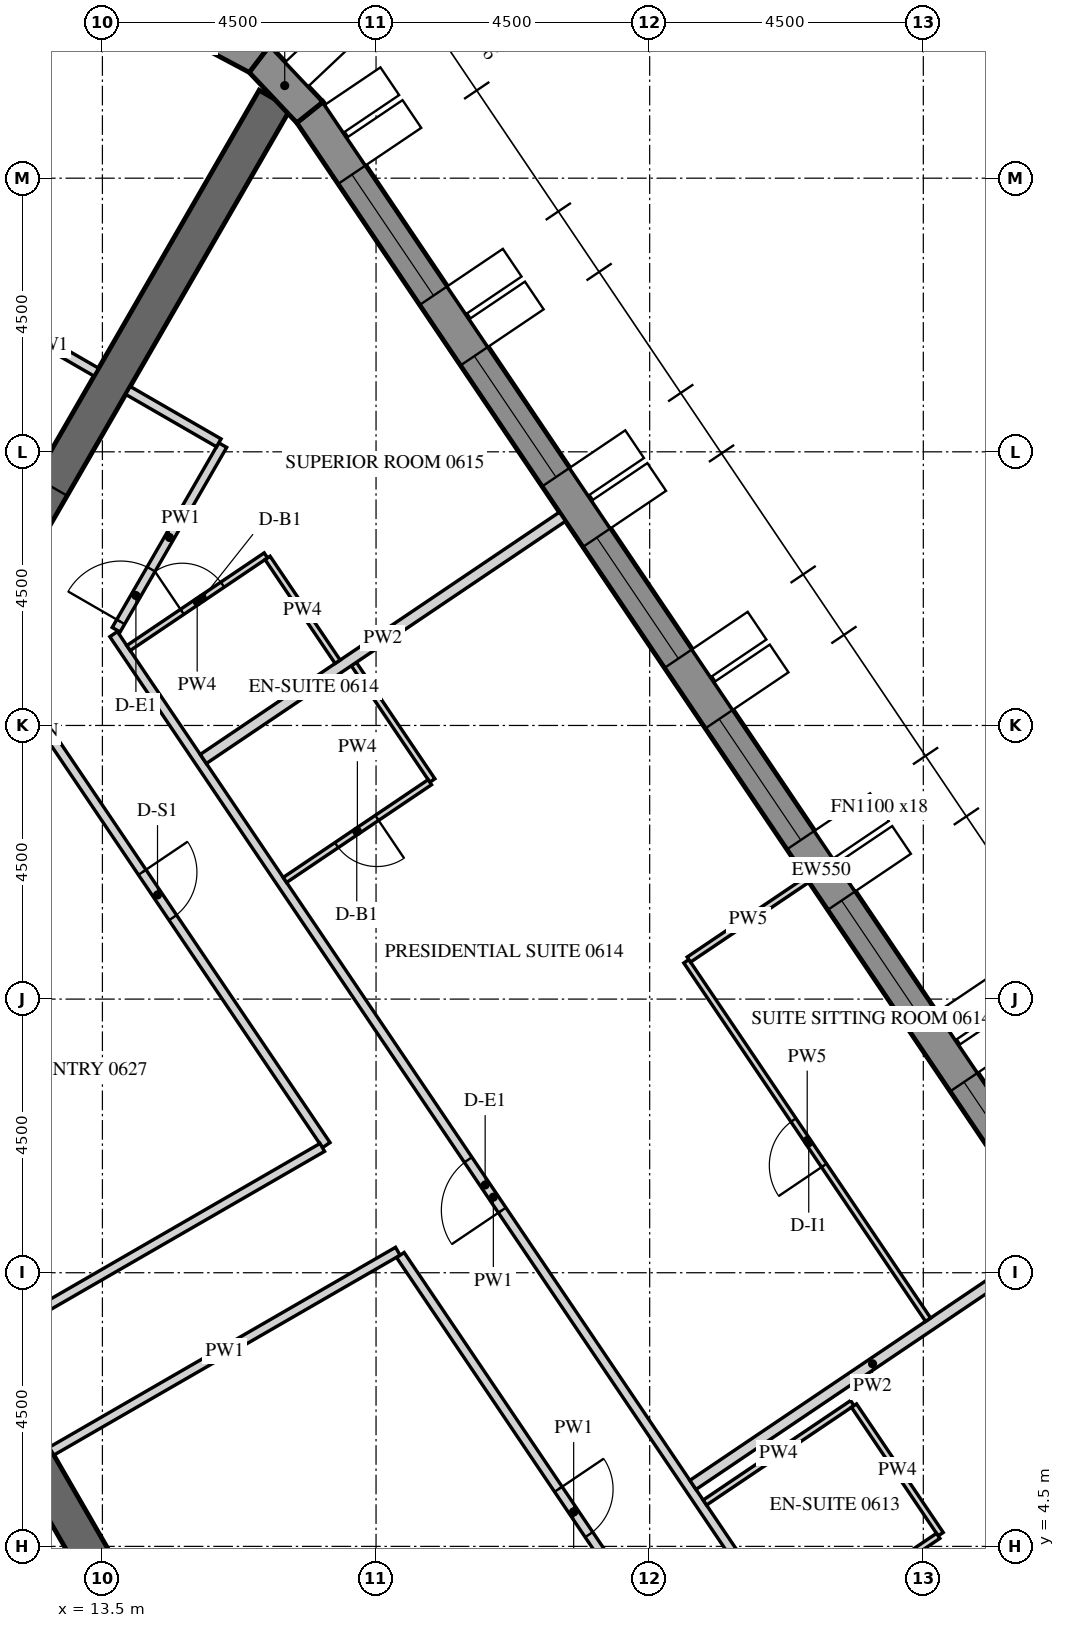
"""IFC4 building model, lengths in metres.
Left out: names, types, materials, properties, quantities, classifications, styles, units other than length and angle.
Written with IfcOpenShell. Run it as: python <this file> out.ifc"""

import sys

from ifc_helpers import new_model, si_unit, direction, frame, frame_2d, origin, place, context, subcontext, project, spatial, polyline, rectangle, outline, extrude, element, fill, save


model = new_model("IFC4")
c1 = context("Model", 3, precision=1e-05, world=origin(), true_north=direction((0.0, 1.0)))
c2 = subcontext(c1, "Body", "Model", "MODEL_VIEW")
j1 = project(units=[si_unit("LENGTHUNIT", "METRE"), si_unit("PLANEANGLEUNIT", "RADIAN")], contexts=[c1])
p1 = place(None, origin())
s1 = spatial("IfcSite", under=j1, at=p1, CompositionType="ELEMENT")
p2 = place(p1, origin())
s2 = spatial("IfcBuilding", under=s1, at=p2, CompositionType="ELEMENT")
p3 = place(p2, frame((0.0, 0.0, 92.1)))
s3 = spatial("IfcBuildingStorey", under=s2, at=p3, CompositionType="ELEMENT", Elevation=92.1)
p4 = place(p3, frame((33.728, 3.153, -0.15), z_axis=(0.0, 0.0, 1.0), x_axis=(-0.559192411416, 0.82903790445, 0.0)))
e1 = element("IfcWall", 1, at=p4, inside=s3, PredefinedType="SOLIDWALL", context=c2, shape_type="SweptSolid", body=[
    extrude(outline(polyline([(-0.026, -0.275), (30.093, -0.275), (30.048, 0.275), (0.026, 0.275), (-0.026, -0.275)])), origin(), (0.0, 0.0, 1.0), 3.9),
])
p5 = place(p4, frame((1.236, 0.0, 1.05)))
e2 = element("IfcOpeningElement", 2, at=p5, cuts=e1, PredefinedType="OPENING", context=c2, shape_type="SweptSolid", body=[
    extrude(rectangle(XDim=2.4, YDim=2.4, at=frame_2d((1.2, 1.2))), frame((0.0, 0.285, 0.0), z_axis=(0.0, -1.0, 0.0), x_axis=(1.0, 0.0, 0.0)), (0.0, 0.0, 1.0), 0.57),
])
p6 = place(p4, frame((4.835, 0.0, 1.05)))
e3 = element("IfcOpeningElement", 3, at=p6, cuts=e1, PredefinedType="OPENING", context=c2, shape_type="SweptSolid", body=[
    extrude(rectangle(XDim=2.4, YDim=2.4, at=frame_2d((1.2, 1.2))), frame((0.0, 0.285, 0.0), z_axis=(0.0, -1.0, 0.0), x_axis=(1.0, 0.0, 0.0)), (0.0, 0.0, 1.0), 0.57),
])
p7 = place(p4, frame((8.436, 0.0, 1.05)))
e4 = element("IfcOpeningElement", 4, at=p7, cuts=e1, PredefinedType="OPENING", context=c2, shape_type="SweptSolid", body=[
    extrude(rectangle(XDim=2.4, YDim=2.4, at=frame_2d((1.2, 1.2))), frame((0.0, 0.285, 0.0), z_axis=(0.0, -1.0, 0.0), x_axis=(1.0, 0.0, 0.0)), (0.0, 0.0, 1.0), 0.57),
])
p8 = place(p4, frame((12.035, 0.0, 1.05)))
e5 = element("IfcOpeningElement", 5, at=p8, cuts=e1, PredefinedType="OPENING", context=c2, shape_type="SweptSolid", body=[
    extrude(rectangle(XDim=2.4, YDim=2.4, at=frame_2d((1.2, 1.2))), frame((0.0, 0.285, 0.0), z_axis=(0.0, -1.0, 0.0), x_axis=(1.0, 0.0, 0.0)), (0.0, 0.0, 1.0), 0.57),
])
p9 = place(p4, frame((15.635, 0.0, 1.05)))
e6 = element("IfcOpeningElement", 6, at=p9, cuts=e1, PredefinedType="OPENING", context=c2, shape_type="SweptSolid", body=[
    extrude(rectangle(XDim=2.4, YDim=2.4, at=frame_2d((1.2, 1.2))), frame((0.0, 0.285, 0.0), z_axis=(0.0, -1.0, 0.0), x_axis=(1.0, 0.0, 0.0)), (0.0, 0.0, 1.0), 0.57),
])
p10 = place(p4, frame((19.236, 0.0, 1.05)))
e7 = element("IfcOpeningElement", 7, at=p10, cuts=e1, PredefinedType="OPENING", context=c2, shape_type="SweptSolid", body=[
    extrude(rectangle(XDim=2.4, YDim=2.4, at=frame_2d((1.2, 1.2))), frame((0.0, 0.285, 0.0), z_axis=(0.0, -1.0, 0.0), x_axis=(1.0, 0.0, 0.0)), (0.0, 0.0, 1.0), 0.57),
])
p11 = place(p4, frame((22.835, 0.0, 1.05)))
e8 = element("IfcOpeningElement", 8, at=p11, cuts=e1, PredefinedType="OPENING", context=c2, shape_type="SweptSolid", body=[
    extrude(rectangle(XDim=2.4, YDim=2.4, at=frame_2d((1.2, 1.2))), frame((0.0, 0.285, 0.0), z_axis=(0.0, -1.0, 0.0), x_axis=(1.0, 0.0, 0.0)), (0.0, 0.0, 1.0), 0.57),
])
p12 = place(p4, frame((26.436, 0.0, 1.05)))
e9 = element("IfcOpeningElement", 9, at=p12, cuts=e1, PredefinedType="OPENING", context=c2, shape_type="SweptSolid", body=[
    extrude(rectangle(XDim=2.4, YDim=2.4, at=frame_2d((1.2, 1.2))), frame((0.0, 0.285, 0.0), z_axis=(0.0, -1.0, 0.0), x_axis=(1.0, 0.0, 0.0)), (0.0, 0.0, 1.0), 0.57),
])
p13 = place(p3, frame((16.913, 28.083, -0.15), z_axis=(0.0, 0.0, 1.0), x_axis=(-0.686196220404, 0.727416488061, 0.0)))
e10 = element("IfcWall", 10, at=p13, inside=s3, PredefinedType="SOLIDWALL", context=c2, shape_type="SweptSolid", body=[
    extrude(outline(polyline([(-0.022, -0.275), (1.253, -0.275), (1.163, 0.275), (0.022, 0.275), (-0.022, -0.275)])), origin(), (0.0, 0.0, 1.0), 3.9),
])
p14 = place(p3, frame((16.083, 28.962, -0.15), z_axis=(0.0, 0.0, 1.0), x_axis=(-0.882995347911, 0.469381737574, 0.0)))
e11 = element("IfcWall", 11, at=p14, inside=s3, PredefinedType="SOLIDWALL", context=c2, shape_type="SweptSolid", body=[
    extrude(outline(polyline([(-0.045, -0.275), (1.253, -0.275), (1.163, 0.275), (0.045, 0.275), (-0.045, -0.275)])), origin(), (0.0, 0.0, 1.0), 3.9),
])
p15 = place(p3, frame((15.819, 0.0, -0.15), z_axis=(0.0, 0.0, 1.0), x_axis=(-0.499999880136, 0.866025472988, 0.0)))
e12 = element("IfcWall", 12, at=p15, inside=s3, PredefinedType="SHEAR", context=c2, shape_type="SweptSolid", body=[
    extrude(outline(polyline([(-0.173, -0.3), (15.993, -0.3), (15.646, 0.3), (0.173, 0.3), (-0.173, -0.3)])), origin(), (0.0, 0.0, 1.0), 3.9),
])
p16 = place(p15, frame((6.981, 0.0, 0.15)))
e13 = element("IfcOpeningElement", 13, at=p16, cuts=e12, PredefinedType="OPENING", context=c2, shape_type="SweptSolid", body=[
    extrude(rectangle(XDim=1.8, YDim=2.4, at=frame_2d((0.9, 1.2))), frame((0.0, 0.31, 0.0), z_axis=(0.0, -1.0, 0.0), x_axis=(1.0, 0.0, 0.0)), (0.0, 0.0, 1.0), 0.62),
])
p17 = place(p3, frame((8.083, 14.0, -0.15), z_axis=(0.0, 0.0, 1.0), x_axis=(0.499997680643, 0.866026742862, 0.0)))
e14 = element("IfcWall", 14, at=p17, inside=s3, PredefinedType="SHEAR", context=c2, shape_type="SweptSolid", body=[
    extrude(rectangle(XDim=16.509, YDim=0.6, at=frame_2d((8.254, 0.0))), origin(), (0.0, 0.0, 1.0), 3.9),
])
p18 = place(p17, frame((7.354, 0.0, 0.15)))
e15 = element("IfcOpeningElement", 15, at=p18, cuts=e14, PredefinedType="OPENING", context=c2, shape_type="SweptSolid", body=[
    extrude(rectangle(XDim=1.8, YDim=2.4, at=frame_2d((0.9, 1.2))), frame((0.0, 0.31, 0.0), z_axis=(0.0, -1.0, 0.0), x_axis=(1.0, 0.0, 0.0)), (0.0, 0.0, 1.0), 0.62),
])
p19 = place(p3, frame((13.4, 23.81, 0.0), z_axis=(0.0, 0.0, 1.0), x_axis=(-0.865989075817, 0.500062916607, 0.0)))
e16 = element("IfcWall", 16, at=p19, inside=s3, PredefinedType="PARTITIONING", context=c2, shape_type="SweptSolid", body=[
    extrude(rectangle(XDim=1.8, YDim=0.15, at=frame_2d((0.9, 0.0))), origin(), (0.0, 0.0, 1.0), 2.988),
])
p20 = place(p3, frame((26.174, 0.985, 0.0), z_axis=(0.0, 0.0, 1.0), x_axis=(-0.559199676409, 0.82903300411, 0.0)))
e17 = element("IfcWall", 17, at=p20, inside=s3, PredefinedType="PARTITIONING", context=c2, shape_type="SweptSolid", body=[
    extrude(rectangle(XDim=22.335, YDim=0.15, at=frame_2d((11.168, 0.0))), origin(), (0.0, 0.0, 1.0), 2.988),
])
p21 = place(p20, frame((0.863, 0.0, 0.0)))
e18 = element("IfcOpeningElement", 18, at=p21, cuts=e17, PredefinedType="OPENING", context=c2, shape_type="SweptSolid", body=[
    extrude(rectangle(XDim=1.0, YDim=2.1, at=frame_2d((0.5, 1.05))), frame((0.0, 0.085, 0.0), z_axis=(0.0, -1.0, 0.0), x_axis=(1.0, 0.0, 0.0)), (0.0, 0.0, 1.0), 0.17),
])
p22 = place(p20, frame((10.909, 0.0, 0.0)))
e19 = element("IfcOpeningElement", 19, at=p22, cuts=e17, PredefinedType="OPENING", context=c2, shape_type="SweptSolid", body=[
    extrude(rectangle(XDim=1.0, YDim=2.1, at=frame_2d((0.5, 1.05))), frame((0.0, 0.085, 0.0), z_axis=(0.0, -1.0, 0.0), x_axis=(1.0, 0.0, 0.0)), (0.0, 0.0, 1.0), 0.17),
])
p23 = place(p3, frame((13.726, 19.574, 0.0), z_axis=(0.0, 0.0, 1.0), x_axis=(0.499951531933, 0.866053385028, 0.0)))
e20 = element("IfcWall", 20, at=p23, inside=s3, PredefinedType="PARTITIONING", context=c2, shape_type="SweptSolid", body=[
    extrude(rectangle(XDim=3.506, YDim=0.15, at=frame_2d((1.753, 0.0))), origin(), (0.0, 0.0, 1.0), 2.988),
])
p24 = place(p23, frame((0.15, 0.0, 0.0)))
e21 = element("IfcOpeningElement", 21, at=p24, cuts=e20, PredefinedType="OPENING", context=c2, shape_type="SweptSolid", body=[
    extrude(rectangle(XDim=1.0, YDim=2.1, at=frame_2d((0.5, 1.05))), frame((0.0, 0.085, 0.0), z_axis=(0.0, -1.0, 0.0), x_axis=(1.0, 0.0, 0.0)), (0.0, 0.0, 1.0), 0.17),
])
p25 = place(p3, frame((15.414, 22.648, 0.0), z_axis=(0.0, 0.0, 1.0), x_axis=(-0.866074815912, 0.499914405916, 0.0)))
e22 = element("IfcWall", 22, at=p25, inside=s3, PredefinedType="PARTITIONING", context=c2, shape_type="SweptSolid", body=[
    extrude(rectangle(XDim=1.725, YDim=0.15, at=frame_2d((0.862, 0.0))), origin(), (0.0, 0.0, 1.0), 2.988),
])
p26 = place(p3, frame((12.664, 6.066, 0.0), z_axis=(0.0, 0.0, 1.0), x_axis=(0.866027295802, 0.499996722915, 0.0)))
e23 = element("IfcWall", 23, at=p26, inside=s3, PredefinedType="PARTITIONING", context=c2, shape_type="SweptSolid", body=[
    extrude(rectangle(XDim=6.575, YDim=0.15, at=frame_2d((3.288, 0.0))), origin(), (0.0, 0.0, 1.0), 2.988),
])
p27 = place(p3, frame((18.4, 9.291, 0.0), z_axis=(0.0, 0.0, 1.0), x_axis=(0.559191829043, -0.829038297265, 0.0)))
e24 = element("IfcWall", 24, at=p27, inside=s3, PredefinedType="PARTITIONING", context=c2, shape_type="SweptSolid", body=[
    extrude(rectangle(XDim=10.192, YDim=0.15, at=frame_2d((5.096, 0.0))), origin(), (0.0, 0.0, 1.0), 2.988),
])
p28 = place(p27, frame((4.646, 0.0, 0.0)))
e25 = element("IfcOpeningElement", 25, at=p28, cuts=e24, PredefinedType="OPENING", context=c2, shape_type="SweptSolid", body=[
    extrude(rectangle(XDim=0.9, YDim=2.1, at=frame_2d((0.45, 1.05))), frame((0.0, 0.085, 0.0), z_axis=(0.0, -1.0, 0.0), x_axis=(1.0, 0.0, 0.0)), (0.0, 0.0, 1.0), 0.17),
])
p29 = place(p3, frame((11.632, 19.326, 0.0), z_axis=(0.0, 0.0, 1.0), x_axis=(0.559193968377, -0.829036854266, 0.0)))
e26 = element("IfcWall", 26, at=p29, inside=s3, PredefinedType="PARTITIONING", context=c2, shape_type="SweptSolid", body=[
    extrude(rectangle(XDim=9.924, YDim=0.15, at=frame_2d((4.962, 0.0))), origin(), (0.0, 0.0, 1.0), 2.988),
])
p30 = place(p29, frame((4.512, 0.0, 0.0)))
e27 = element("IfcOpeningElement", 27, at=p30, cuts=e26, PredefinedType="OPENING", context=c2, shape_type="SweptSolid", body=[
    extrude(rectangle(XDim=0.9, YDim=2.1, at=frame_2d((0.45, 1.05))), frame((0.0, 0.085, 0.0), z_axis=(0.0, -1.0, 0.0), x_axis=(1.0, 0.0, 0.0)), (0.0, 0.0, 1.0), 0.17),
])
p31 = place(p3, frame((17.116, 11.061, 0.0), z_axis=(0.0, 0.0, 1.0), x_axis=(-0.866021127751, -0.500007406234, 0.0)))
e28 = element("IfcWall", 28, at=p31, inside=s3, PredefinedType="PARTITIONING", context=c2, shape_type="SweptSolid", body=[
    extrude(rectangle(XDim=6.354, YDim=0.15, at=frame_2d((3.177, 0.0))), origin(), (0.0, 0.0, 1.0), 2.988),
])
p32 = place(p3, frame((23.407, 5.221, 0.0), z_axis=(0.0, 0.0, 1.0), x_axis=(0.829007334469, 0.559237730663, 0.0)))
e29 = element("IfcWall", 29, at=p32, inside=s3, PredefinedType="PARTITIONING", context=c2, shape_type="SweptSolid", body=[
    extrude(rectangle(XDim=2.925, YDim=0.1, at=frame_2d((1.462, 0.0))), origin(), (0.0, 0.0, 1.0), 2.988),
])
p33 = place(p3, frame((25.86, 6.815, 0.0), z_axis=(0.0, 0.0, 1.0), x_axis=(0.559155442782, -0.829062838878, 0.0)))
e30 = element("IfcWall", 30, at=p33, inside=s3, PredefinedType="PARTITIONING", context=c2, shape_type="SweptSolid", body=[
    extrude(rectangle(XDim=2.55, YDim=0.1, at=frame_2d((1.275, 0.0))), origin(), (0.0, 0.0, 1.0), 2.988),
])
p34 = place(p3, frame((27.245, 4.673, 0.0), z_axis=(0.0, 0.0, 1.0), x_axis=(-0.82904649496, -0.559179675234, 0.0)))
e31 = element("IfcWall", 31, at=p34, inside=s3, PredefinedType="PARTITIONING", context=c2, shape_type="SweptSolid", body=[
    extrude(rectangle(XDim=2.875, YDim=0.1, at=frame_2d((1.438, 0.0))), origin(), (0.0, 0.0, 1.0), 2.988),
])
p35 = place(p34, frame((1.05, 0.0, 0.0)))
e32 = element("IfcOpeningElement", 32, at=p35, cuts=e31, PredefinedType="OPENING", context=c2, shape_type="SweptSolid", body=[
    extrude(rectangle(XDim=0.8, YDim=2.1, at=frame_2d((0.4, 1.05))), frame((0.0, 0.06, 0.0), z_axis=(0.0, -1.0, 0.0), x_axis=(1.0, 0.0, 0.0)), (0.0, 0.0, 1.0), 0.12),
])
p36 = place(p3, frame((29.119, 9.495, 0.0), z_axis=(0.0, 0.0, 1.0), x_axis=(-0.82903334026, -0.559199178055, 0.0)))
e33 = element("IfcWall", 33, at=p36, inside=s3, PredefinedType="PARTITIONING", context=c2, shape_type="SweptSolid", body=[
    extrude(rectangle(XDim=7.125, YDim=0.18, at=frame_2d((3.562, 0.0))), origin(), (0.0, 0.0, 1.0), 2.988),
])
p37 = place(p3, frame((17.635, 19.01, 0.0), z_axis=(0.0, 0.0, 1.0), x_axis=(0.559204176839, -0.829029968461, 0.0)))
e34 = element("IfcWall", 34, at=p37, inside=s3, PredefinedType="PARTITIONING", context=c2, shape_type="SweptSolid", body=[
    extrude(rectangle(XDim=2.31, YDim=0.1, at=frame_2d((1.155, 0.0))), origin(), (0.0, 0.0, 1.0), 2.988),
])
p38 = place(p3, frame((18.885, 17.067, 0.0), z_axis=(0.0, 0.0, 1.0), x_axis=(-0.829019940088, -0.55921904379, 0.0)))
e35 = element("IfcWall", 35, at=p38, inside=s3, PredefinedType="PARTITIONING", context=c2, shape_type="SweptSolid", body=[
    extrude(rectangle(XDim=2.875, YDim=0.1, at=frame_2d((1.438, 0.0))), origin(), (0.0, 0.0, 1.0), 2.988),
])
p39 = place(p38, frame((1.05, 0.0, 0.0)))
e36 = element("IfcOpeningElement", 36, at=p39, cuts=e35, PredefinedType="OPENING", context=c2, shape_type="SweptSolid", body=[
    extrude(rectangle(XDim=0.8, YDim=2.1, at=frame_2d((0.4, 1.05))), frame((0.0, 0.06, 0.0), z_axis=(0.0, -1.0, 0.0), x_axis=(1.0, 0.0, 0.0)), (0.0, 0.0, 1.0), 0.12),
])
p40 = place(p3, frame((27.079, 8.228, 0.0), z_axis=(0.0, 0.0, 1.0), x_axis=(-0.559200948469, 0.829032146078, 0.0)))
e37 = element("IfcWall", 37, at=p40, inside=s3, PredefinedType="PARTITIONING", context=c2, shape_type="SweptSolid", body=[
    extrude(rectangle(XDim=7.11, YDim=0.1, at=frame_2d((3.555, 0.0))), origin(), (0.0, 0.0, 1.0), 2.988),
])
p41 = place(p40, frame((3.06, 0.0, 0.0)))
e38 = element("IfcOpeningElement", 38, at=p41, cuts=e37, PredefinedType="OPENING", context=c2, shape_type="SweptSolid", body=[
    extrude(rectangle(XDim=0.9, YDim=2.1, at=frame_2d((0.45, 1.05))), frame((0.0, 0.06, 0.0), z_axis=(0.0, -1.0, 0.0), x_axis=(1.0, 0.0, 0.0)), (0.0, 0.0, 1.0), 0.12),
])
p42 = place(p3, frame((23.144, 14.15, 0.0), z_axis=(0.0, 0.0, 1.0), x_axis=(0.829065408555, 0.559151632687, 0.0)))
e39 = element("IfcWall", 39, at=p42, inside=s3, PredefinedType="PARTITIONING", context=c2, shape_type="SweptSolid", body=[
    extrude(rectangle(XDim=2.35, YDim=0.1, at=frame_2d((1.175, 0.0))), origin(), (0.0, 0.0, 1.0), 2.988),
])
p43 = place(p3, frame((21.066, 21.433, 0.0), z_axis=(0.0, 0.0, 1.0), x_axis=(-0.829022625118, -0.559215063318, 0.0)))
e40 = element("IfcWall", 40, at=p43, inside=s3, PredefinedType="PARTITIONING", context=c2, shape_type="SweptSolid", body=[
    extrude(rectangle(XDim=7.125, YDim=0.18, at=frame_2d((3.562, 0.0))), origin(), (0.0, 0.0, 1.0), 2.988),
])
p44 = place(p3, frame((13.929, 19.273, 0.0), z_axis=(0.0, 0.0, 1.0), x_axis=(0.829047014003, 0.559178905694, 0.0)))
e41 = element("IfcWall", 41, at=p44, inside=s3, PredefinedType="PARTITIONING", context=c2, shape_type="SweptSolid", body=[
    extrude(rectangle(XDim=2.725, YDim=0.1, at=frame_2d((1.362, 0.0))), origin(), (0.0, 0.0, 1.0), 2.988),
])
p45 = place(p44, frame((1.065, 0.0, 0.0)))
e42 = element("IfcOpeningElement", 42, at=p45, cuts=e41, PredefinedType="OPENING", context=c2, shape_type="SweptSolid", body=[
    extrude(rectangle(XDim=0.8, YDim=2.1, at=frame_2d((0.4, 1.05))), frame((0.0, 0.06, 0.0), z_axis=(0.0, -1.0, 0.0), x_axis=(1.0, 0.0, 0.0)), (0.0, 0.0, 1.0), 0.12),
])
p46 = place(p3, frame((16.216, 20.755, 0.0), z_axis=(0.0, 0.0, 1.0), x_axis=(0.559259117518, -0.828992906769, 0.0)))
e43 = element("IfcWall", 43, at=p46, inside=s3, PredefinedType="PARTITIONING", context=c2, shape_type="SweptSolid", body=[
    extrude(rectangle(XDim=2.06, YDim=0.1, at=frame_2d((1.03, 0.0))), origin(), (0.0, 0.0, 1.0), 2.988),
])
p47 = place(p7, frame((0.0, 0.205, 0.0)))
e44 = element("IfcWindow", 44, at=p47, inside=s3, PartitioningType="DOUBLE_PANEL_VERTICAL", PredefinedType="WINDOW", context=c2, shape_type="SweptSolid", body=[
    extrude(rectangle(XDim=2.4, YDim=2.4, at=frame_2d((1.2, 1.2))), frame((0.0, 0.03, 0.0), z_axis=(0.0, -1.0, 0.0), x_axis=(1.0, 0.0, 0.0)), (0.0, 0.0, 1.0), 0.06),
])
fill(e4, e44)
p48 = place(p8, frame((0.0, 0.205, 0.0)))
e45 = element("IfcWindow", 45, at=p48, inside=s3, PartitioningType="DOUBLE_PANEL_VERTICAL", PredefinedType="WINDOW", context=c2, shape_type="SweptSolid", body=[
    extrude(rectangle(XDim=2.4, YDim=2.4, at=frame_2d((1.2, 1.2))), frame((0.0, 0.03, 0.0), z_axis=(0.0, -1.0, 0.0), x_axis=(1.0, 0.0, 0.0)), (0.0, 0.0, 1.0), 0.06),
])
fill(e5, e45)
p49 = place(p9, frame((0.0, 0.205, 0.0)))
e46 = element("IfcWindow", 46, at=p49, inside=s3, PartitioningType="DOUBLE_PANEL_VERTICAL", PredefinedType="WINDOW", context=c2, shape_type="SweptSolid", body=[
    extrude(rectangle(XDim=2.4, YDim=2.4, at=frame_2d((1.2, 1.2))), frame((0.0, 0.03, 0.0), z_axis=(0.0, -1.0, 0.0), x_axis=(1.0, 0.0, 0.0)), (0.0, 0.0, 1.0), 0.06),
])
fill(e6, e46)
p50 = place(p10, frame((0.0, 0.205, 0.0)))
e47 = element("IfcWindow", 47, at=p50, inside=s3, PartitioningType="DOUBLE_PANEL_VERTICAL", PredefinedType="WINDOW", context=c2, shape_type="SweptSolid", body=[
    extrude(rectangle(XDim=2.4, YDim=2.4, at=frame_2d((1.2, 1.2))), frame((0.0, 0.03, 0.0), z_axis=(0.0, -1.0, 0.0), x_axis=(1.0, 0.0, 0.0)), (0.0, 0.0, 1.0), 0.06),
])
fill(e7, e47)
p51 = place(p11, frame((0.0, 0.205, 0.0)))
e48 = element("IfcWindow", 48, at=p51, inside=s3, PartitioningType="DOUBLE_PANEL_VERTICAL", PredefinedType="WINDOW", context=c2, shape_type="SweptSolid", body=[
    extrude(rectangle(XDim=2.4, YDim=2.4, at=frame_2d((1.2, 1.2))), frame((0.0, 0.03, 0.0), z_axis=(0.0, -1.0, 0.0), x_axis=(1.0, 0.0, 0.0)), (0.0, 0.0, 1.0), 0.06),
])
fill(e8, e48)
p52 = place(p12, frame((0.0, 0.205, 0.0)))
e49 = element("IfcWindow", 49, at=p52, inside=s3, PartitioningType="DOUBLE_PANEL_VERTICAL", PredefinedType="WINDOW", context=c2, shape_type="SweptSolid", body=[
    extrude(rectangle(XDim=2.4, YDim=2.4, at=frame_2d((1.2, 1.2))), frame((0.0, 0.03, 0.0), z_axis=(0.0, -1.0, 0.0), x_axis=(1.0, 0.0, 0.0)), (0.0, 0.0, 1.0), 0.06),
])
fill(e9, e49)
p53 = place(p22, origin())
e50 = element("IfcDoor", 50, at=p53, inside=s3, OperationType="SINGLE_SWING_RIGHT", PredefinedType="DOOR", context=c2, shape_type="SweptSolid", body=[
    extrude(rectangle(XDim=1.0, YDim=2.1, at=frame_2d((0.5, 1.05))), frame((0.0, 0.025, 0.0), z_axis=(0.0, -1.0, 0.0), x_axis=(1.0, 0.0, 0.0)), (0.0, 0.0, 1.0), 0.05),
])
fill(e19, e50)
p54 = place(p39, origin())
e51 = element("IfcDoor", 51, at=p54, inside=s3, OperationType="SINGLE_SWING_LEFT", PredefinedType="DOOR", context=c2, shape_type="SweptSolid", body=[
    extrude(rectangle(XDim=0.8, YDim=2.1, at=frame_2d((0.4, 1.05))), frame((0.0, 0.025, 0.0), z_axis=(0.0, -1.0, 0.0), x_axis=(1.0, 0.0, 0.0)), (0.0, 0.0, 1.0), 0.05),
])
fill(e36, e51)
p55 = place(p41, origin())
e52 = element("IfcDoor", 52, at=p55, inside=s3, OperationType="SINGLE_SWING_RIGHT", PredefinedType="DOOR", context=c2, shape_type="SweptSolid", body=[
    extrude(rectangle(XDim=0.9, YDim=2.1, at=frame_2d((0.45, 1.05))), frame((0.0, 0.025, 0.0), z_axis=(0.0, -1.0, 0.0), x_axis=(1.0, 0.0, 0.0)), (0.0, 0.0, 1.0), 0.05),
])
fill(e38, e52)
p56 = place(p24, origin())
e53 = element("IfcDoor", 53, at=p56, inside=s3, OperationType="SINGLE_SWING_LEFT", PredefinedType="DOOR", context=c2, shape_type="SweptSolid", body=[
    extrude(rectangle(XDim=1.0, YDim=2.1, at=frame_2d((0.5, 1.05))), frame((0.0, 0.025, 0.0), z_axis=(0.0, -1.0, 0.0), x_axis=(1.0, 0.0, 0.0)), (0.0, 0.0, 1.0), 0.05),
])
fill(e21, e53)
p57 = place(p45, origin())
e54 = element("IfcDoor", 54, at=p57, inside=s3, OperationType="SINGLE_SWING_LEFT", PredefinedType="DOOR", context=c2, shape_type="SweptSolid", body=[
    extrude(rectangle(XDim=0.8, YDim=2.1, at=frame_2d((0.4, 1.05))), frame((0.0, 0.025, 0.0), z_axis=(0.0, -1.0, 0.0), x_axis=(1.0, 0.0, 0.0)), (0.0, 0.0, 1.0), 0.05),
])
fill(e42, e54)
p58 = place(p28, origin())
e55 = element("IfcDoor", 55, at=p58, inside=s3, OperationType="SINGLE_SWING_RIGHT", PredefinedType="DOOR", context=c2, shape_type="SweptSolid", body=[
    extrude(rectangle(XDim=0.9, YDim=2.1, at=frame_2d((0.45, 1.05))), frame((0.0, 0.025, 0.0), z_axis=(0.0, -1.0, 0.0), x_axis=(1.0, 0.0, 0.0)), (0.0, 0.0, 1.0), 0.05),
])
fill(e25, e55)
p59 = place(p30, origin())
e56 = element("IfcDoor", 56, at=p59, inside=s3, OperationType="SINGLE_SWING_LEFT", PredefinedType="DOOR", context=c2, shape_type="SweptSolid", body=[
    extrude(rectangle(XDim=0.9, YDim=2.1, at=frame_2d((0.45, 1.05))), frame((0.0, 0.025, 0.0), z_axis=(0.0, -1.0, 0.0), x_axis=(1.0, 0.0, 0.0)), (0.0, 0.0, 1.0), 0.05),
])
fill(e27, e56)
save(model, sys.argv[1])
